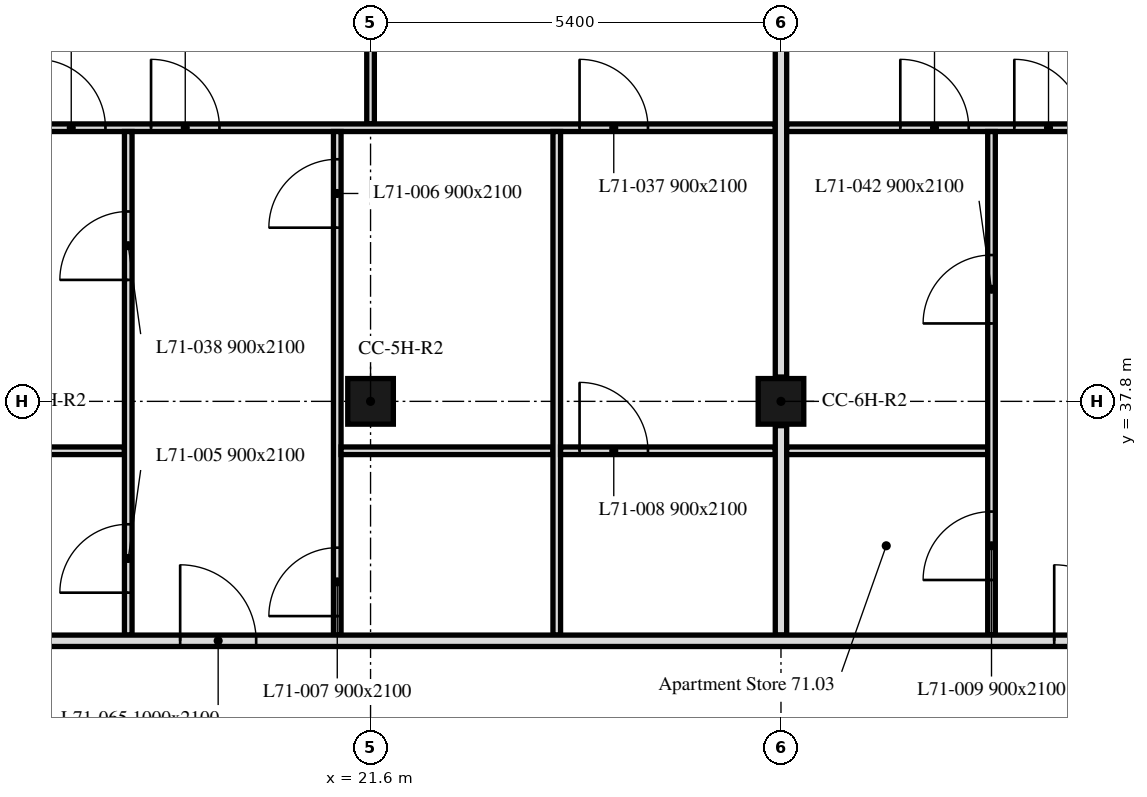
"""IFC4 building model, lengths in metres.
Left out: names, types, materials, properties, quantities, classifications, styles, units other than length and angle.
Written with IfcOpenShell. Run it as: python <this file> out.ifc"""

import sys

from ifc_helpers import new_model, si_unit, direction, frame, frame_2d, origin, origin_2d, place, context, subcontext, project, spatial, rectangle, extrude, element, fill, save


model = new_model("IFC4")
c1 = context("Model", 3, precision=1e-05, world=origin(), true_north=direction((0.0, 1.0)))
c2 = subcontext(c1, "Body", "Model", "MODEL_VIEW")
j1 = project(units=[si_unit("LENGTHUNIT", "METRE"), si_unit("PLANEANGLEUNIT", "RADIAN")], contexts=[c1])
p1 = place(None, origin())
s1 = spatial("IfcSite", under=j1, at=p1, CompositionType="ELEMENT")
p2 = place(p1, origin())
s2 = spatial("IfcBuilding", under=s1, at=p2, CompositionType="ELEMENT")
p3 = place(p2, frame((0.0, 0.0, 288.4)))
s3 = spatial("IfcBuildingStorey", under=s2, at=p3, CompositionType="ELEMENT", Elevation=288.4)
for number, where, z_axis, x_axis in (
    (1, (21.6, 37.8, 0.0), (0.0, 0.0, 1.0), (1.0, 0.0, 0.0)),
    (2, (27.0, 37.8, 0.0), (0.0, 0.0, 1.0), (1.0, 0.0, 0.0)),
):
    element("IfcColumn", number, at=place(p3, frame(where, z_axis=z_axis, x_axis=x_axis)), inside=s3, PredefinedType="COLUMN", context=c2, shape_type="SweptSolid", body=[
        extrude(rectangle(XDim=0.6, YDim=0.6, at=origin_2d()), origin(), (0.0, 0.0, 1.0), 3.0),
    ])
p4 = place(p3, frame((21.6, 41.45, 0.0), z_axis=(0.0, 0.0, 1.0), x_axis=(0.0, 1.0, 0.0)))
e3 = element("IfcWall", 3, at=p4, inside=s3, PredefinedType="PARTITIONING", context=c2, shape_type="SweptSolid", body=[
    extrude(rectangle(XDim=1.43, YDim=0.1, at=frame_2d((0.715, 0.0))), origin(), (0.0, 0.0, 1.0), 2.4),
])
p5 = place(p3, frame((16.275, 41.4, 0.0), z_axis=(0.0, 0.0, 1.0), x_axis=(1.0, 0.0, 0.0)))
e4 = element("IfcWall", 4, at=p5, inside=s3, PredefinedType="PARTITIONING", context=c2, shape_type="SweptSolid", body=[
    extrude(rectangle(XDim=10.65, YDim=0.1, at=frame_2d((5.325, 0.0))), origin(), (0.0, 0.0, 1.0), 2.4),
])
p6 = place(p5, frame((0.937, 0.0, 0.0)))
e5 = element("IfcOpeningElement", 5, at=p6, cuts=e4, PredefinedType="OPENING", context=c2, shape_type="SweptSolid", body=[
    extrude(rectangle(XDim=0.9, YDim=2.1, at=frame_2d((0.45, 1.05))), frame((0.0, 0.05, 0.0), z_axis=(0.0, -1.0, 0.0), x_axis=(1.0, 0.0, 0.0)), (0.0, 0.0, 1.0), 0.1),
])
p7 = place(p5, frame((8.075, 0.0, 0.0)))
e6 = element("IfcOpeningElement", 6, at=p7, cuts=e4, PredefinedType="OPENING", context=c2, shape_type="SweptSolid", body=[
    extrude(rectangle(XDim=0.9, YDim=2.1, at=frame_2d((0.45, 1.05))), frame((0.0, 0.05, 0.0), z_axis=(0.0, -1.0, 0.0), x_axis=(1.0, 0.0, 0.0)), (0.0, 0.0, 1.0), 0.1),
])
p8 = place(p5, frame((2.437, 0.0, 0.0)))
e7 = element("IfcOpeningElement", 7, at=p8, cuts=e4, PredefinedType="OPENING", context=c2, shape_type="SweptSolid", body=[
    extrude(rectangle(XDim=0.9, YDim=2.1, at=frame_2d((0.45, 1.05))), frame((0.0, 0.05, 0.0), z_axis=(0.0, -1.0, 0.0), x_axis=(1.0, 0.0, 0.0)), (0.0, 0.0, 1.0), 0.1),
])
p9 = place(p3, frame((16.275, 37.15, 0.0), z_axis=(0.0, 0.0, 1.0), x_axis=(1.0, 0.0, 0.0)))
e8 = element("IfcWall", 8, at=p9, inside=s3, PredefinedType="PARTITIONING", context=c2, shape_type="SweptSolid", body=[
    extrude(rectangle(XDim=2.087, YDim=0.1, at=frame_2d((1.043, 0.0))), origin(), (0.0, 0.0, 1.0), 3.0),
])
p10 = place(p3, frame((18.412, 34.725, 0.0), z_axis=(0.0, 0.0, 1.0), x_axis=(0.0, 1.0, 0.0)))
e9 = element("IfcWall", 9, at=p10, inside=s3, PredefinedType="PARTITIONING", context=c2, shape_type="SweptSolid", body=[
    extrude(rectangle(XDim=6.625, YDim=0.1, at=frame_2d((3.312, 0.0))), origin(), (0.0, 0.0, 1.0), 3.0),
])
p11 = place(p10, frame((0.558, 0.0, 0.0)))
e10 = element("IfcOpeningElement", 10, at=p11, cuts=e9, PredefinedType="OPENING", context=c2, shape_type="SweptSolid", body=[
    extrude(rectangle(XDim=0.9, YDim=2.1, at=frame_2d((0.45, 1.05))), frame((0.0, 0.05, 0.0), z_axis=(0.0, -1.0, 0.0), x_axis=(1.0, 0.0, 0.0)), (0.0, 0.0, 1.0), 0.1),
])
p12 = place(p10, frame((4.673, 0.0, 0.0)))
e11 = element("IfcOpeningElement", 11, at=p12, cuts=e9, PredefinedType="OPENING", context=c2, shape_type="SweptSolid", body=[
    extrude(rectangle(XDim=0.9, YDim=2.1, at=frame_2d((0.45, 1.05))), frame((0.0, 0.05, 0.0), z_axis=(0.0, -1.0, 0.0), x_axis=(1.0, 0.0, 0.0)), (0.0, 0.0, 1.0), 0.1),
])
p13 = place(p3, frame((21.162, 34.725, 0.0), z_axis=(0.0, 0.0, 1.0), x_axis=(0.0, 1.0, 0.0)))
e12 = element("IfcWall", 12, at=p13, inside=s3, PredefinedType="PARTITIONING", context=c2, shape_type="SweptSolid", body=[
    extrude(rectangle(XDim=6.625, YDim=0.1, at=frame_2d((3.312, 0.0))), origin(), (0.0, 0.0, 1.0), 3.0),
])
p14 = place(p13, frame((5.36, 0.0, 0.0)))
e13 = element("IfcOpeningElement", 13, at=p14, cuts=e12, PredefinedType="OPENING", context=c2, shape_type="SweptSolid", body=[
    extrude(rectangle(XDim=0.9, YDim=2.1, at=frame_2d((0.45, 1.05))), frame((0.0, 0.05, 0.0), z_axis=(0.0, -1.0, 0.0), x_axis=(1.0, 0.0, 0.0)), (0.0, 0.0, 1.0), 0.1),
])
p15 = place(p13, frame((0.25, 0.0, 0.0)))
e14 = element("IfcOpeningElement", 14, at=p15, cuts=e12, PredefinedType="OPENING", context=c2, shape_type="SweptSolid", body=[
    extrude(rectangle(XDim=0.9, YDim=2.1, at=frame_2d((0.45, 1.05))), frame((0.0, 0.05, 0.0), z_axis=(0.0, -1.0, 0.0), x_axis=(1.0, 0.0, 0.0)), (0.0, 0.0, 1.0), 0.1),
])
p16 = place(p3, frame((21.212, 37.15, 0.0), z_axis=(0.0, 0.0, 1.0), x_axis=(1.0, 0.0, 0.0)))
e15 = element("IfcWall", 15, at=p16, inside=s3, PredefinedType="PARTITIONING", context=c2, shape_type="SweptSolid", body=[
    extrude(rectangle(XDim=2.788, YDim=0.1, at=frame_2d((1.394, 0.0))), origin(), (0.0, 0.0, 1.0), 2.4),
])
p17 = place(p3, frame((24.05, 34.725, 0.0), z_axis=(0.0, 0.0, 1.0), x_axis=(0.0, 1.0, 0.0)))
e16 = element("IfcWall", 16, at=p17, inside=s3, PredefinedType="PARTITIONING", context=c2, shape_type="SweptSolid", body=[
    extrude(rectangle(XDim=6.625, YDim=0.1, at=frame_2d((3.312, 0.0))), origin(), (0.0, 0.0, 1.0), 3.0),
])
p18 = place(p3, frame((27.0, 38.12, 0.0), z_axis=(0.0, 0.0, 1.0), x_axis=(0.0, 1.0, 0.0)))
e17 = element("IfcWall", 17, at=p18, inside=s3, PredefinedType="PARTITIONING", context=c2, shape_type="SweptSolid", body=[
    extrude(rectangle(XDim=4.76, YDim=0.15, at=frame_2d((2.38, 0.0))), origin(), (0.0, 0.0, 1.0), 2.4),
])
p19 = place(p3, frame((24.1, 37.15, 0.0), z_axis=(0.0, 0.0, 1.0), x_axis=(1.0, 0.0, 0.0)))
e18 = element("IfcWall", 18, at=p19, inside=s3, PredefinedType="PARTITIONING", context=c2, shape_type="SweptSolid", body=[
    extrude(rectangle(XDim=2.825, YDim=0.1, at=frame_2d((1.413, 0.0))), origin(), (0.0, 0.0, 1.0), 3.0),
])
p20 = place(p19, frame((0.25, 0.0, 0.0)))
e19 = element("IfcOpeningElement", 19, at=p20, cuts=e18, PredefinedType="OPENING", context=c2, shape_type="SweptSolid", body=[
    extrude(rectangle(XDim=0.9, YDim=2.1, at=frame_2d((0.45, 1.05))), frame((0.0, 0.05, 0.0), z_axis=(0.0, -1.0, 0.0), x_axis=(1.0, 0.0, 0.0)), (0.0, 0.0, 1.0), 0.1),
])
p21 = place(p3, frame((27.0, 34.725, 0.0), z_axis=(0.0, 0.0, 1.0), x_axis=(0.0, 1.0, 0.0)))
e20 = element("IfcWall", 20, at=p21, inside=s3, PredefinedType="PARTITIONING", context=c2, shape_type="SweptSolid", body=[
    extrude(rectangle(XDim=2.755, YDim=0.15, at=frame_2d((1.377, 0.0))), origin(), (0.0, 0.0, 1.0), 2.4),
])
p22 = place(p3, frame((27.075, 41.4, 0.0), z_axis=(0.0, 0.0, 1.0), x_axis=(1.0, 0.0, 0.0)))
e21 = element("IfcWall", 21, at=p22, inside=s3, PredefinedType="PARTITIONING", context=c2, shape_type="SweptSolid", body=[
    extrude(rectangle(XDim=5.275, YDim=0.1, at=frame_2d((2.638, 0.0))), origin(), (0.0, 0.0, 1.0), 3.0),
])
p23 = place(p22, frame((1.495, 0.0, 0.0)))
e22 = element("IfcOpeningElement", 22, at=p23, cuts=e21, PredefinedType="OPENING", context=c2, shape_type="SweptSolid", body=[
    extrude(rectangle(XDim=0.9, YDim=2.1, at=frame_2d((0.45, 1.05))), frame((0.0, 0.05, 0.0), z_axis=(0.0, -1.0, 0.0), x_axis=(1.0, 0.0, 0.0)), (0.0, 0.0, 1.0), 0.1),
])
p24 = place(p22, frame((2.995, 0.0, 0.0)))
e23 = element("IfcOpeningElement", 23, at=p24, cuts=e21, PredefinedType="OPENING", context=c2, shape_type="SweptSolid", body=[
    extrude(rectangle(XDim=0.9, YDim=2.1, at=frame_2d((0.45, 1.05))), frame((0.0, 0.05, 0.0), z_axis=(0.0, -1.0, 0.0), x_axis=(1.0, 0.0, 0.0)), (0.0, 0.0, 1.0), 0.1),
])
p25 = place(p3, frame((27.075, 37.15, 0.0), z_axis=(0.0, 0.0, 1.0), x_axis=(1.0, 0.0, 0.0)))
e24 = element("IfcWall", 24, at=p25, inside=s3, PredefinedType="PARTITIONING", context=c2, shape_type="SweptSolid", body=[
    extrude(rectangle(XDim=2.645, YDim=0.1, at=frame_2d((1.323, 0.0))), origin(), (0.0, 0.0, 1.0), 3.0),
])
p26 = place(p3, frame((29.77, 34.725, 0.0), z_axis=(0.0, 0.0, 1.0), x_axis=(0.0, 1.0, 0.0)))
e25 = element("IfcWall", 25, at=p26, inside=s3, PredefinedType="PARTITIONING", context=c2, shape_type="SweptSolid", body=[
    extrude(rectangle(XDim=6.625, YDim=0.1, at=frame_2d((3.312, 0.0))), origin(), (0.0, 0.0, 1.0), 3.0),
])
p27 = place(p26, frame((0.725, 0.0, 0.0)))
e26 = element("IfcOpeningElement", 26, at=p27, cuts=e25, PredefinedType="OPENING", context=c2, shape_type="SweptSolid", body=[
    extrude(rectangle(XDim=0.9, YDim=2.1, at=frame_2d((0.45, 1.05))), frame((0.0, 0.05, 0.0), z_axis=(0.0, -1.0, 0.0), x_axis=(1.0, 0.0, 0.0)), (0.0, 0.0, 1.0), 0.1),
])
p28 = place(p26, frame((4.1, 0.0, 0.0)))
e27 = element("IfcOpeningElement", 27, at=p28, cuts=e25, PredefinedType="OPENING", context=c2, shape_type="SweptSolid", body=[
    extrude(rectangle(XDim=0.9, YDim=2.1, at=frame_2d((0.45, 1.05))), frame((0.0, 0.05, 0.0), z_axis=(0.0, -1.0, 0.0), x_axis=(1.0, 0.0, 0.0)), (0.0, 0.0, 1.0), 0.1),
])
p29 = place(p3, frame((6.151, 34.65, 0.0), z_axis=(0.0, 0.0, 1.0), x_axis=(1.0, 0.0, 0.0)))
e28 = element("IfcWall", 28, at=p29, inside=s3, PredefinedType="PARTITIONING", context=c2, shape_type="SweptSolid", body=[
    extrude(rectangle(XDim=41.698, YDim=0.15, at=frame_2d((20.849, 0.0))), origin(), (0.0, 0.0, 1.0), 2.4),
])
p30 = place(p29, frame((2.969, 0.0, 0.0)))
e29 = element("IfcOpeningElement", 29, at=p30, cuts=e28, PredefinedType="OPENING", context=c2, shape_type="SweptSolid", body=[
    extrude(rectangle(XDim=1.0, YDim=2.1, at=frame_2d((0.5, 1.05))), frame((0.0, 0.075, 0.0), z_axis=(0.0, -1.0, 0.0), x_axis=(1.0, 0.0, 0.0)), (0.0, 0.0, 1.0), 0.15),
])
p31 = place(p29, frame((12.944, 0.0, 0.0)))
e30 = element("IfcOpeningElement", 30, at=p31, cuts=e28, PredefinedType="OPENING", context=c2, shape_type="SweptSolid", body=[
    extrude(rectangle(XDim=1.0, YDim=2.1, at=frame_2d((0.5, 1.05))), frame((0.0, 0.075, 0.0), z_axis=(0.0, -1.0, 0.0), x_axis=(1.0, 0.0, 0.0)), (0.0, 0.0, 1.0), 0.15),
])
p32 = place(p29, frame((24.444, 0.0, 0.0)))
e31 = element("IfcOpeningElement", 31, at=p32, cuts=e28, PredefinedType="OPENING", context=c2, shape_type="SweptSolid", body=[
    extrude(rectangle(XDim=1.0, YDim=2.1, at=frame_2d((0.5, 1.05))), frame((0.0, 0.075, 0.0), z_axis=(0.0, -1.0, 0.0), x_axis=(1.0, 0.0, 0.0)), (0.0, 0.0, 1.0), 0.15),
])
p33 = place(p29, frame((34.964, 0.0, 0.0)))
e32 = element("IfcOpeningElement", 32, at=p33, cuts=e28, PredefinedType="OPENING", context=c2, shape_type="SweptSolid", body=[
    extrude(rectangle(XDim=1.0, YDim=2.1, at=frame_2d((0.5, 1.05))), frame((0.0, 0.075, 0.0), z_axis=(0.0, -1.0, 0.0), x_axis=(1.0, 0.0, 0.0)), (0.0, 0.0, 1.0), 0.15),
])
p34 = place(p11, origin())
e33 = element("IfcDoor", 33, at=p34, inside=s3, OperationType="SINGLE_SWING_RIGHT", PredefinedType="DOOR", context=c2, shape_type="SweptSolid", body=[
    extrude(rectangle(XDim=0.9, YDim=2.1, at=frame_2d((0.45, 1.05))), frame((0.0, 0.025, 0.0), z_axis=(0.0, -1.0, 0.0), x_axis=(1.0, 0.0, 0.0)), (0.0, 0.0, 1.0), 0.05),
])
fill(e10, e33)
p35 = place(p14, origin())
e34 = element("IfcDoor", 34, at=p35, inside=s3, OperationType="SINGLE_SWING_LEFT", PredefinedType="DOOR", context=c2, shape_type="SweptSolid", body=[
    extrude(rectangle(XDim=0.9, YDim=2.1, at=frame_2d((0.45, 1.05))), frame((0.0, 0.025, 0.0), z_axis=(0.0, -1.0, 0.0), x_axis=(1.0, 0.0, 0.0)), (0.0, 0.0, 1.0), 0.05),
])
fill(e13, e34)
p36 = place(p15, origin())
e35 = element("IfcDoor", 35, at=p36, inside=s3, OperationType="SINGLE_SWING_LEFT", PredefinedType="DOOR", context=c2, shape_type="SweptSolid", body=[
    extrude(rectangle(XDim=0.9, YDim=2.1, at=frame_2d((0.45, 1.05))), frame((0.0, 0.025, 0.0), z_axis=(0.0, -1.0, 0.0), x_axis=(1.0, 0.0, 0.0)), (0.0, 0.0, 1.0), 0.05),
])
fill(e14, e35)
p37 = place(p20, origin())
e36 = element("IfcDoor", 36, at=p37, inside=s3, OperationType="SINGLE_SWING_LEFT", PredefinedType="DOOR", context=c2, shape_type="SweptSolid", body=[
    extrude(rectangle(XDim=0.9, YDim=2.1, at=frame_2d((0.45, 1.05))), frame((0.0, 0.025, 0.0), z_axis=(0.0, -1.0, 0.0), x_axis=(1.0, 0.0, 0.0)), (0.0, 0.0, 1.0), 0.05),
])
fill(e19, e36)
p38 = place(p27, origin())
e37 = element("IfcDoor", 37, at=p38, inside=s3, OperationType="SINGLE_SWING_LEFT", PredefinedType="DOOR", context=c2, shape_type="SweptSolid", body=[
    extrude(rectangle(XDim=0.9, YDim=2.1, at=frame_2d((0.45, 1.05))), frame((0.0, 0.025, 0.0), z_axis=(0.0, -1.0, 0.0), x_axis=(1.0, 0.0, 0.0)), (0.0, 0.0, 1.0), 0.05),
])
fill(e26, e37)
p39 = place(p6, origin())
e38 = element("IfcDoor", 38, at=p39, inside=s3, OperationType="SINGLE_SWING_RIGHT", PredefinedType="DOOR", context=c2, shape_type="SweptSolid", body=[
    extrude(rectangle(XDim=0.9, YDim=2.1, at=frame_2d((0.45, 1.05))), frame((0.0, 0.025, 0.0), z_axis=(0.0, -1.0, 0.0), x_axis=(1.0, 0.0, 0.0)), (0.0, 0.0, 1.0), 0.05),
])
fill(e5, e38)
p40 = place(p7, origin())
e39 = element("IfcDoor", 39, at=p40, inside=s3, OperationType="SINGLE_SWING_LEFT", PredefinedType="DOOR", context=c2, shape_type="SweptSolid", body=[
    extrude(rectangle(XDim=0.9, YDim=2.1, at=frame_2d((0.45, 1.05))), frame((0.0, 0.025, 0.0), z_axis=(0.0, -1.0, 0.0), x_axis=(1.0, 0.0, 0.0)), (0.0, 0.0, 1.0), 0.05),
])
fill(e6, e39)
p41 = place(p12, origin())
e40 = element("IfcDoor", 40, at=p41, inside=s3, OperationType="SINGLE_SWING_LEFT", PredefinedType="DOOR", context=c2, shape_type="SweptSolid", body=[
    extrude(rectangle(XDim=0.9, YDim=2.1, at=frame_2d((0.45, 1.05))), frame((0.0, 0.025, 0.0), z_axis=(0.0, -1.0, 0.0), x_axis=(1.0, 0.0, 0.0)), (0.0, 0.0, 1.0), 0.05),
])
fill(e11, e40)
p42 = place(p23, origin())
e41 = element("IfcDoor", 41, at=p42, inside=s3, OperationType="SINGLE_SWING_RIGHT", PredefinedType="DOOR", context=c2, shape_type="SweptSolid", body=[
    extrude(rectangle(XDim=0.9, YDim=2.1, at=frame_2d((0.45, 1.05))), frame((0.0, 0.025, 0.0), z_axis=(0.0, -1.0, 0.0), x_axis=(1.0, 0.0, 0.0)), (0.0, 0.0, 1.0), 0.05),
])
fill(e22, e41)
p43 = place(p28, origin())
e42 = element("IfcDoor", 42, at=p43, inside=s3, OperationType="SINGLE_SWING_RIGHT", PredefinedType="DOOR", context=c2, shape_type="SweptSolid", body=[
    extrude(rectangle(XDim=0.9, YDim=2.1, at=frame_2d((0.45, 1.05))), frame((0.0, 0.025, 0.0), z_axis=(0.0, -1.0, 0.0), x_axis=(1.0, 0.0, 0.0)), (0.0, 0.0, 1.0), 0.05),
])
fill(e27, e42)
p44 = place(p8, origin())
e43 = element("IfcDoor", 43, at=p44, inside=s3, OperationType="SINGLE_SWING_LEFT", PredefinedType="DOOR", context=c2, shape_type="SweptSolid", body=[
    extrude(rectangle(XDim=0.9, YDim=2.1, at=frame_2d((0.45, 1.05))), frame((0.0, 0.025, 0.0), z_axis=(0.0, -1.0, 0.0), x_axis=(1.0, 0.0, 0.0)), (0.0, 0.0, 1.0), 0.05),
])
fill(e7, e43)
p45 = place(p24, origin())
e44 = element("IfcDoor", 44, at=p45, inside=s3, OperationType="SINGLE_SWING_LEFT", PredefinedType="DOOR", context=c2, shape_type="SweptSolid", body=[
    extrude(rectangle(XDim=0.9, YDim=2.1, at=frame_2d((0.45, 1.05))), frame((0.0, 0.025, 0.0), z_axis=(0.0, -1.0, 0.0), x_axis=(1.0, 0.0, 0.0)), (0.0, 0.0, 1.0), 0.05),
])
fill(e23, e44)
p46 = place(p31, origin())
e45 = element("IfcDoor", 45, at=p46, inside=s3, OperationType="SINGLE_SWING_RIGHT", PredefinedType="DOOR", context=c2, shape_type="SweptSolid", body=[
    extrude(rectangle(XDim=1.0, YDim=2.1, at=frame_2d((0.5, 1.05))), frame((0.0, 0.025, 0.0), z_axis=(0.0, -1.0, 0.0), x_axis=(1.0, 0.0, 0.0)), (0.0, 0.0, 1.0), 0.05),
])
fill(e30, e45)
p47 = place(p32, origin())
e46 = element("IfcDoor", 46, at=p47, inside=s3, OperationType="SINGLE_SWING_LEFT", PredefinedType="DOOR", context=c2, shape_type="SweptSolid", body=[
    extrude(rectangle(XDim=1.0, YDim=2.1, at=frame_2d((0.5, 1.05))), frame((0.0, 0.025, 0.0), z_axis=(0.0, -1.0, 0.0), x_axis=(1.0, 0.0, 0.0)), (0.0, 0.0, 1.0), 0.05),
])
fill(e31, e46)
save(model, sys.argv[1])
